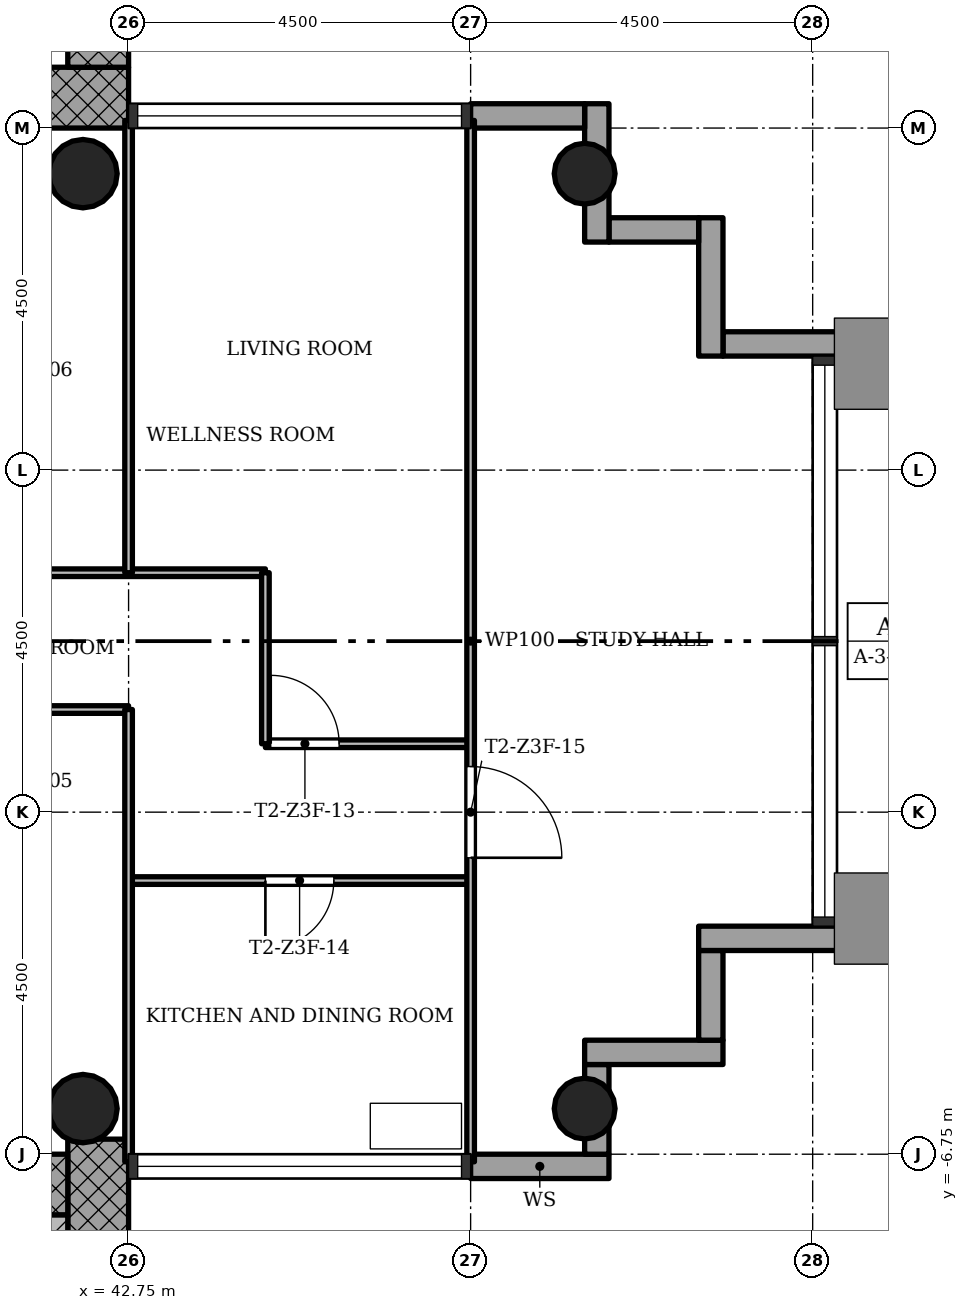
"""IFC4 building model, lengths in metres.
Left out: names, types, materials, properties, quantities, classifications, styles, units other than length and angle.
Written with IfcOpenShell. Run it as: python <this file> out.ifc"""

import sys

from ifc_helpers import new_model, si_unit, direction, frame, frame_2d, origin, origin_2d, place, context, subcontext, project, spatial, rectangle, hollow_circle, extrude, element, fill, save


model = new_model("IFC4")
c1 = context("Model", 3, precision=1e-05, world=origin(), true_north=direction((0.0, 1.0)))
c2 = subcontext(c1, "Body", "Model", "MODEL_VIEW")
j1 = project(units=[si_unit("LENGTHUNIT", "METRE"), si_unit("PLANEANGLEUNIT", "RADIAN")], contexts=[c1])
p1 = place(None, origin())
s1 = spatial("IfcSite", under=j1, at=p1, CompositionType="ELEMENT")
p2 = place(p1, origin())
s2 = spatial("IfcBuilding", under=s1, at=p2, CompositionType="ELEMENT")
p3 = place(p2, frame((0.0, 0.0, 171.1)))
s3 = spatial("IfcBuildingStorey", under=s2, at=p3, CompositionType="ELEMENT", Elevation=171.1)
p4 = place(p3, frame((30.05, 7.15, 0.0), z_axis=(0.0, 0.0, 1.0), x_axis=(1.0, 0.0, 0.0)))
e1 = element("IfcWall", 1, at=p4, inside=s3, PredefinedType="SHEAR", context=c2, shape_type="SweptSolid", body=[
    extrude(rectangle(XDim=12.7, YDim=0.8, at=frame_2d((6.35, 0.0))), origin(), (0.0, 0.0, 1.0), 3.4),
])
p5 = place(p4, frame((5.05, 0.0, 0.0)))
e2 = element("IfcOpeningElement", 2, at=p5, cuts=e1, PredefinedType="OPENING", context=c2, shape_type="SweptSolid", body=[
    extrude(rectangle(XDim=1.8, YDim=2.1, at=frame_2d((0.9, 1.05))), frame((0.0, 0.41, 0.0), z_axis=(0.0, -1.0, 0.0), x_axis=(1.0, 0.0, 0.0)), (0.0, 0.0, 1.0), 0.82),
])
p6 = place(p3, frame((42.35, 7.55, 0.0), z_axis=(0.0, 0.0, 1.0), x_axis=(0.0, 1.0, 0.0)))
e3 = element("IfcWall", 3, at=p6, inside=s3, PredefinedType="SHEAR", context=c2, shape_type="SweptSolid", body=[
    extrude(rectangle(XDim=8.2, YDim=0.8, at=frame_2d((4.1, 0.0))), origin(), (0.0, 0.0, 1.0), 3.4),
])
p7 = place(p3, frame((42.35, -14.95, 0.0), z_axis=(0.0, 0.0, 1.0), x_axis=(0.0, 1.0, 0.0)))
e4 = element("IfcWall", 4, at=p7, inside=s3, PredefinedType="SHEAR", context=c2, shape_type="SweptSolid", body=[
    extrude(rectangle(XDim=8.398, YDim=0.8, at=frame_2d((4.199, 0.0))), origin(), (0.0, 0.0, 1.0), 3.4),
])
p8 = place(p3, frame((41.95, -7.15, 0.0), z_axis=(0.0, 0.0, 1.0), x_axis=(-1.0, 0.0, 0.0)))
e5 = element("IfcWall", 5, at=p8, inside=s3, PredefinedType="SHEAR", context=c2, shape_type="SweptSolid", body=[
    extrude(rectangle(XDim=12.7, YDim=0.8, at=frame_2d((6.35, 0.0))), origin(), (0.0, 0.0, 1.0), 3.4),
])
p9 = place(p8, frame((5.05, 0.0, 0.0)))
e6 = element("IfcOpeningElement", 6, at=p9, cuts=e5, PredefinedType="OPENING", context=c2, shape_type="SweptSolid", body=[
    extrude(rectangle(XDim=1.8, YDim=2.1, at=frame_2d((0.9, 1.05))), frame((0.0, 0.41, 0.0), z_axis=(0.0, -1.0, 0.0), x_axis=(1.0, 0.0, 0.0)), (0.0, 0.0, 1.0), 0.82),
])
for number, where, z_axis, x_axis in (
    (7, (48.75, -6.15, 0.0), (0.0, 0.0, 1.0), (1.0, 0.0, 0.0)),
    (8, (48.75, 6.15, 0.0), (0.0, 0.0, 1.0), (1.0, 0.0, 0.0)),
):
    element("IfcColumn", number, at=place(p3, frame(where, z_axis=z_axis, x_axis=x_axis)), inside=s3, PredefinedType="COLUMN", context=c2, shape_type="SweptSolid", body=[
        extrude(hollow_circle(Radius=0.4, WallThickness=0.028, at=origin_2d()), origin(), (0.0, 0.0, 1.0), 3.4),
    ])
for number, where, z_axis, x_axis in (
    (9, (42.15, -6.15, 0.0), (0.0, 0.0, 1.0), (1.0, 0.0, 0.0)),
    (10, (42.15, 6.15, 0.0), (0.0, 0.0, 1.0), (1.0, 0.0, 0.0)),
):
    element("IfcColumn", number, at=place(p3, frame(where, z_axis=z_axis, x_axis=x_axis)), inside=s3, PredefinedType="COLUMN", context=c2, shape_type="SweptSolid", body=[
        extrude(hollow_circle(Radius=0.45, WallThickness=0.032, at=origin_2d()), origin(), (0.0, 0.0, 1.0), 3.4),
    ])
p10 = place(p3, frame((47.25, -6.91, -0.3), z_axis=(0.0, 0.0, 1.0), x_axis=(1.0, 0.0, 0.0)))
e11 = element("IfcWall", 11, at=p10, inside=s3, PredefinedType="STANDARD", context=c2, shape_type="SweptSolid", body=[
    extrude(rectangle(XDim=1.82, YDim=0.32, at=frame_2d((0.91, 0.0))), origin(), (0.0, 0.0, 1.0), 3.4),
])
p11 = place(p3, frame((48.91, -6.75, -0.3), z_axis=(0.0, 0.0, 1.0), x_axis=(0.0, 1.0, 0.0)))
e12 = element("IfcWall", 12, at=p11, inside=s3, PredefinedType="STANDARD", context=c2, shape_type="SweptSolid", body=[
    extrude(rectangle(XDim=1.18, YDim=0.32, at=frame_2d((0.59, 0.0))), origin(), (0.0, 0.0, 1.0), 3.4),
])
p12 = place(p3, frame((48.75, -5.41, -0.3), z_axis=(0.0, 0.0, 1.0), x_axis=(1.0, 0.0, 0.0)))
e13 = element("IfcWall", 13, at=p12, inside=s3, PredefinedType="STANDARD", context=c2, shape_type="SweptSolid", body=[
    extrude(rectangle(XDim=1.82, YDim=0.32, at=frame_2d((0.91, 0.0))), origin(), (0.0, 0.0, 1.0), 3.4),
])
p13 = place(p3, frame((50.41, -5.25, -0.3), z_axis=(0.0, 0.0, 1.0), x_axis=(0.0, 1.0, 0.0)))
e14 = element("IfcWall", 14, at=p13, inside=s3, PredefinedType="STANDARD", context=c2, shape_type="SweptSolid", body=[
    extrude(rectangle(XDim=1.18, YDim=0.32, at=frame_2d((0.59, 0.0))), origin(), (0.0, 0.0, 1.0), 3.4),
])
p14 = place(p3, frame((50.25, -3.91, -0.3), z_axis=(0.0, 0.0, 1.0), x_axis=(1.0, 0.0, 0.0)))
e15 = element("IfcWall", 15, at=p14, inside=s3, PredefinedType="STANDARD", context=c2, shape_type="SweptSolid", body=[
    extrude(rectangle(XDim=1.82, YDim=0.32, at=frame_2d((0.91, 0.0))), origin(), (0.0, 0.0, 1.0), 3.4),
])
p15 = place(p3, frame((52.07, 3.91, -0.3), z_axis=(0.0, 0.0, 1.0), x_axis=(-1.0, 0.0, 0.0)))
e16 = element("IfcWall", 16, at=p15, inside=s3, PredefinedType="STANDARD", context=c2, shape_type="SweptSolid", body=[
    extrude(rectangle(XDim=1.5, YDim=0.32, at=frame_2d((0.75, 0.0))), origin(), (0.0, 0.0, 1.0), 3.4),
])
p16 = place(p3, frame((50.41, 3.75, -0.3), z_axis=(0.0, 0.0, 1.0), x_axis=(0.0, 1.0, 0.0)))
e17 = element("IfcWall", 17, at=p16, inside=s3, PredefinedType="STANDARD", context=c2, shape_type="SweptSolid", body=[
    extrude(rectangle(XDim=1.82, YDim=0.32, at=frame_2d((0.91, 0.0))), origin(), (0.0, 0.0, 1.0), 3.4),
])
p17 = place(p3, frame((50.25, 5.41, -0.3), z_axis=(0.0, 0.0, 1.0), x_axis=(-1.0, 0.0, 0.0)))
e18 = element("IfcWall", 18, at=p17, inside=s3, PredefinedType="STANDARD", context=c2, shape_type="SweptSolid", body=[
    extrude(rectangle(XDim=1.18, YDim=0.32, at=frame_2d((0.59, 0.0))), origin(), (0.0, 0.0, 1.0), 3.4),
])
p18 = place(p3, frame((48.91, 5.25, -0.3), z_axis=(0.0, 0.0, 1.0), x_axis=(0.0, 1.0, 0.0)))
e19 = element("IfcWall", 19, at=p18, inside=s3, PredefinedType="STANDARD", context=c2, shape_type="SweptSolid", body=[
    extrude(rectangle(XDim=1.82, YDim=0.32, at=frame_2d((0.91, 0.0))), origin(), (0.0, 0.0, 1.0), 3.4),
])
p19 = place(p3, frame((48.75, 6.91, -0.3), z_axis=(0.0, 0.0, 1.0), x_axis=(-1.0, 0.0, 0.0)))
e20 = element("IfcWall", 20, at=p19, inside=s3, PredefinedType="STANDARD", context=c2, shape_type="SweptSolid", body=[
    extrude(rectangle(XDim=1.5, YDim=0.32, at=frame_2d((0.75, 0.0))), origin(), (0.0, 0.0, 1.0), 3.4),
])
p20 = place(p3, frame((47.25, -3.15, 0.0), z_axis=(0.0, 0.0, 1.0), x_axis=(-1.0, 0.0, 0.0)))
e21 = element("IfcWall", 21, at=p20, inside=s3, PredefinedType="PARTITIONING", context=c2, shape_type="SweptSolid", body=[
    extrude(rectangle(XDim=4.5, YDim=0.1, at=frame_2d((2.25, 0.0))), origin(), (0.0, 0.0, 1.0), 3.0),
])
p21 = place(p20, frame((1.8, 0.0, 0.0)))
e22 = element("IfcOpeningElement", 22, at=p21, cuts=e21, PredefinedType="OPENING", context=c2, shape_type="SweptSolid", body=[
    extrude(rectangle(XDim=0.9, YDim=2.1, at=frame_2d((0.45, 1.05))), frame((0.0, 0.06, 0.0), z_axis=(0.0, -1.0, 0.0), x_axis=(1.0, 0.0, 0.0)), (0.0, 0.0, 1.0), 0.12),
])
p22 = place(p3, frame((47.25, -1.35, 0.0), z_axis=(0.0, 0.0, 1.0), x_axis=(-1.0, 0.0, 0.0)))
e23 = element("IfcWall", 23, at=p22, inside=s3, PredefinedType="PARTITIONING", context=c2, shape_type="SweptSolid", body=[
    extrude(rectangle(XDim=2.7, YDim=0.1, at=frame_2d((1.35, 0.0))), origin(), (0.0, 0.0, 1.0), 3.0),
])
p23 = place(p22, frame((1.73, 0.0, 0.0)))
e24 = element("IfcOpeningElement", 24, at=p23, cuts=e23, PredefinedType="OPENING", context=c2, shape_type="SweptSolid", body=[
    extrude(rectangle(XDim=0.9, YDim=2.1, at=frame_2d((0.45, 1.05))), frame((0.0, 0.06, 0.0), z_axis=(0.0, -1.0, 0.0), x_axis=(1.0, 0.0, 0.0)), (0.0, 0.0, 1.0), 0.12),
])
p24 = place(p3, frame((42.75, -0.9, 0.0), z_axis=(0.0, 0.0, 1.0), x_axis=(-1.0, 0.0, 0.0)))
e25 = element("IfcWall", 25, at=p24, inside=s3, PredefinedType="PARTITIONING", context=c2, shape_type="SweptSolid", body=[
    extrude(rectangle(XDim=2.25, YDim=0.1, at=frame_2d((1.125, 0.0))), origin(), (0.0, 0.0, 1.0), 3.0),
])
p25 = place(p3, frame((44.55, 0.9, 0.0), z_axis=(0.0, 0.0, 1.0), x_axis=(-1.0, 0.0, 0.0)))
e26 = element("IfcWall", 26, at=p25, inside=s3, PredefinedType="PARTITIONING", context=c2, shape_type="SweptSolid", body=[
    extrude(rectangle(XDim=4.05, YDim=0.1, at=frame_2d((2.025, 0.0))), origin(), (0.0, 0.0, 1.0), 3.0),
])
p26 = place(p3, frame((47.25, -6.85, 0.0), z_axis=(0.0, 0.0, 1.0), x_axis=(0.0, 1.0, 0.0)))
e27 = element("IfcWall", 27, at=p26, inside=s3, PredefinedType="PARTITIONING", context=c2, shape_type="SweptSolid", body=[
    extrude(rectangle(XDim=13.7, YDim=0.1, at=frame_2d((6.85, 0.0))), origin(), (0.0, 0.0, 1.0), 3.0),
])
p27 = place(p26, frame((4.0, 0.0, 0.0)))
e28 = element("IfcOpeningElement", 28, at=p27, cuts=e27, PredefinedType="OPENING", context=c2, shape_type="SweptSolid", body=[
    extrude(rectangle(XDim=1.2, YDim=2.1, at=frame_2d((0.6, 1.05))), frame((0.0, 0.06, 0.0), z_axis=(0.0, -1.0, 0.0), x_axis=(1.0, 0.0, 0.0)), (0.0, 0.0, 1.0), 0.12),
])
p28 = place(p3, frame((44.55, -1.35, 0.0), z_axis=(0.0, 0.0, 1.0), x_axis=(0.0, 1.0, 0.0)))
e29 = element("IfcWall", 29, at=p28, inside=s3, PredefinedType="PARTITIONING", context=c2, shape_type="SweptSolid", body=[
    extrude(rectangle(XDim=2.25, YDim=0.1, at=frame_2d((1.125, 0.0))), origin(), (0.0, 0.0, 1.0), 3.0),
])
for number, where, z_axis, x_axis in (
    (30, (42.75, -6.85, 0.0), (0.0, 0.0, 1.0), (0.0, 1.0, 0.0)),
    (31, (42.75, 0.9, 0.0), (0.0, 0.0, 1.0), (0.0, 1.0, 0.0)),
):
    element("IfcWall", number, at=place(p3, frame(where, z_axis=z_axis, x_axis=x_axis)), inside=s3, PredefinedType="PARTITIONING", context=c2, shape_type="SweptSolid", body=[
        extrude(rectangle(XDim=5.95, YDim=0.1, at=frame_2d((2.975, 0.0))), origin(), (0.0, 0.0, 1.0), 3.0),
    ])
p29 = place(p3, frame((37.85, -7.75, 0.0), z_axis=(0.0, 0.0, 1.0), x_axis=(1.0, 0.0, 0.0)))
e32 = element("IfcWall", 32, at=p29, inside=s3, PredefinedType="SHEAR", context=c2, shape_type="SweptSolid", body=[
    extrude(rectangle(XDim=4.1, YDim=0.4, at=frame_2d((2.05, 0.0))), origin(), (0.0, 0.0, 1.0), 3.4),
])
p30 = place(p23, origin())
e33 = element("IfcDoor", 33, at=p30, inside=s3, OperationType="SINGLE_SWING_RIGHT", PredefinedType="DOOR", context=c2, shape_type="SweptSolid", body=[
    extrude(rectangle(XDim=0.9, YDim=2.1, at=frame_2d((0.45, 1.05))), frame((0.0, 0.025, 0.0), z_axis=(0.0, -1.0, 0.0), x_axis=(1.0, 0.0, 0.0)), (0.0, 0.0, 1.0), 0.05),
])
fill(e24, e33)
p31 = place(p21, origin())
e34 = element("IfcDoor", 34, at=p31, inside=s3, OperationType="SINGLE_SWING_LEFT", PredefinedType="DOOR", context=c2, shape_type="SweptSolid", body=[
    extrude(rectangle(XDim=0.9, YDim=2.1, at=frame_2d((0.45, 1.05))), frame((0.0, 0.025, 0.0), z_axis=(0.0, -1.0, 0.0), x_axis=(1.0, 0.0, 0.0)), (0.0, 0.0, 1.0), 0.05),
])
fill(e22, e34)
p32 = place(p27, origin())
e35 = element("IfcDoor", 35, at=p32, inside=s3, OperationType="SINGLE_SWING_LEFT", PredefinedType="DOOR", context=c2, shape_type="SweptSolid", body=[
    extrude(rectangle(XDim=1.2, YDim=2.1, at=frame_2d((0.6, 1.05))), frame((0.0, 0.025, 0.0), z_axis=(0.0, -1.0, 0.0), x_axis=(1.0, 0.0, 0.0)), (0.0, 0.0, 1.0), 0.05),
])
fill(e28, e35)
save(model, sys.argv[1])
